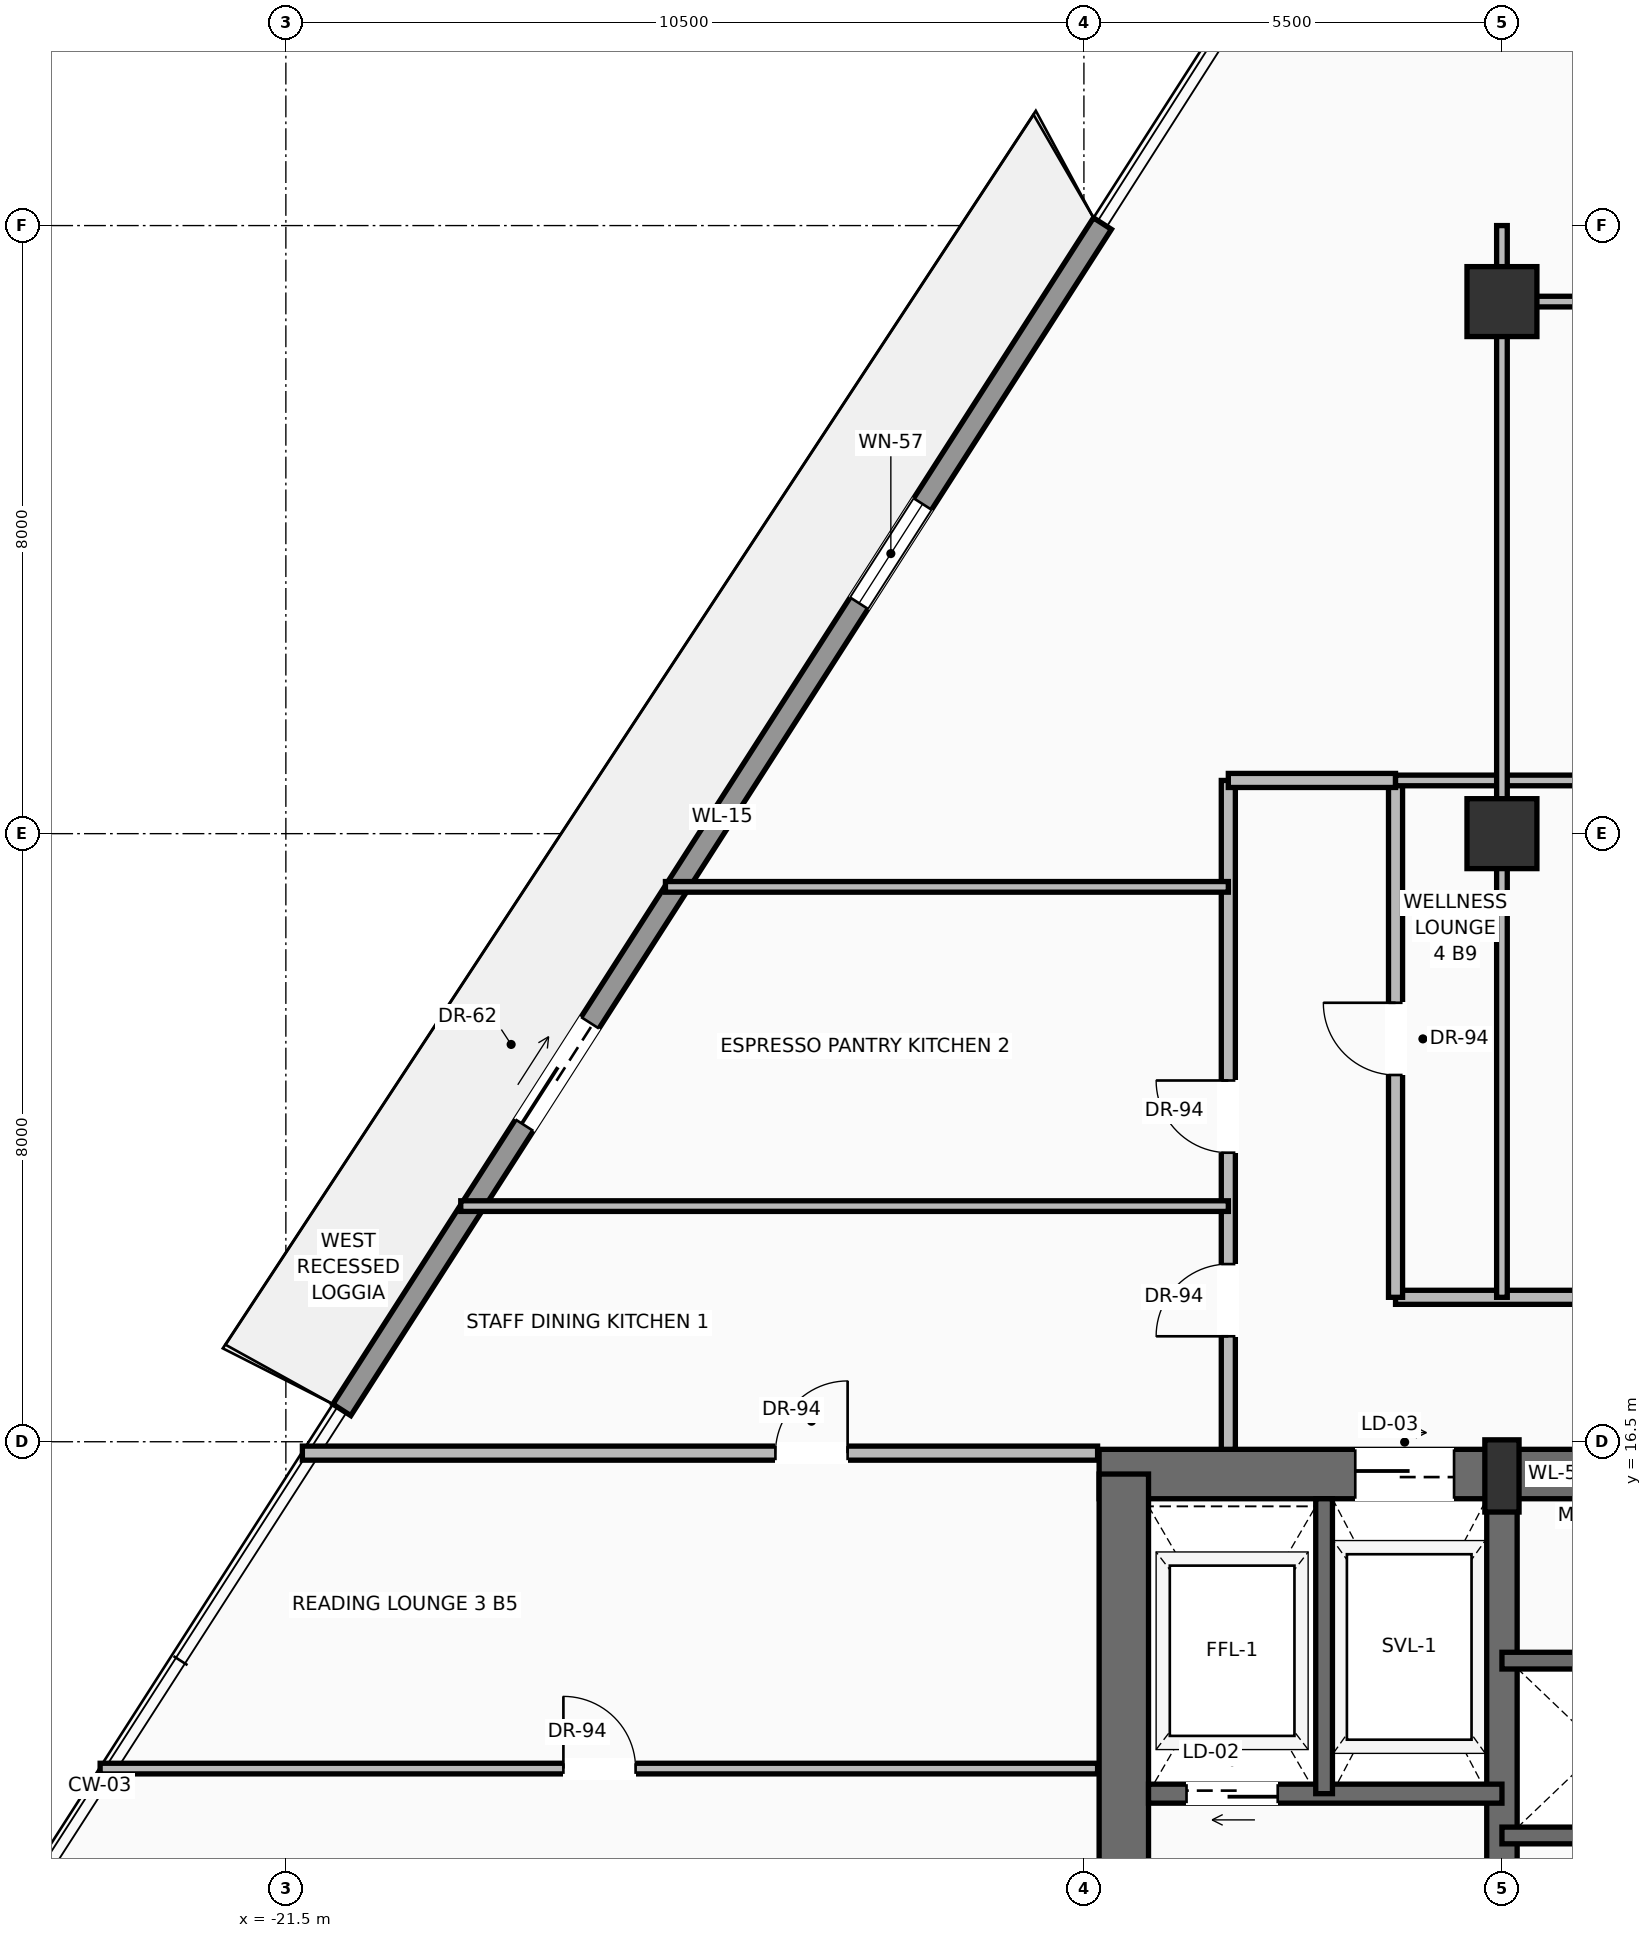
"""IFC4 building model, lengths in metres.
Left out: names, types, materials, properties, quantities, classifications, styles, units other than length and angle.
Written with IfcOpenShell. Run it as: python <this file> out.ifc"""

import sys

from ifc_helpers import new_model, si_unit, direction, frame, frame_2d, origin, origin_2d, place, context, subcontext, project, spatial, rectangle, extrude, source, transform, mapped, element, fill, save


model = new_model("IFC4")
c1 = context("Model", 3, precision=1e-05, world=origin(), true_north=direction((0.0, 1.0)))
c2 = subcontext(c1, "Body", "Model", "MODEL_VIEW")
j1 = project(units=[si_unit("LENGTHUNIT", "METRE"), si_unit("PLANEANGLEUNIT", "RADIAN")], contexts=[c1])
p1 = place(None, origin())
s1 = spatial("IfcSite", under=j1, at=p1, CompositionType="ELEMENT")
p2 = place(p1, origin())
s2 = spatial("IfcBuilding", under=s1, at=p2, CompositionType="ELEMENT")
p3 = place(p2, frame((0.0, 0.0, 155.2)))
s3 = spatial("IfcBuildingStorey", under=s2, at=p3, CompositionType="ELEMENT", Elevation=155.2)
p4 = place(p3, frame((-10.8, 16.075, 0.0), z_axis=(0.0, 0.0, 1.0), x_axis=(1.0, 0.0, 0.0)))
e1 = element("IfcWall", 1, at=p4, inside=s3, PredefinedType="SHEAR", context=c2, shape_type="SweptSolid", body=[
    extrude(rectangle(XDim=21.6, YDim=0.65, at=frame_2d((10.8, 0.0))), origin(), (0.0, 0.0, 1.0), 3.47),
])
p5 = place(p4, frame((3.37, 0.0, 0.0)))
e2 = element("IfcOpeningElement", 2, at=p5, cuts=e1, PredefinedType="OPENING", context=c2, shape_type="SweptSolid", body=[
    extrude(rectangle(XDim=1.3, YDim=2.3, at=frame_2d((0.65, 1.15))), frame((0.0, 0.335, 0.0), z_axis=(0.0, -1.0, 0.0), x_axis=(1.0, 0.0, 0.0)), (0.0, 0.0, 1.0), 0.67),
])
p6 = place(p4, frame((9.8, 0.0, 0.0)))
e3 = element("IfcOpeningElement", 3, at=p6, cuts=e1, PredefinedType="OPENING", context=c2, shape_type="SweptSolid", body=[
    extrude(rectangle(XDim=2.0, YDim=2.4, at=frame_2d((1.0, 1.2))), frame((0.0, 0.335, 0.0), z_axis=(0.0, -1.0, 0.0), x_axis=(1.0, 0.0, 0.0)), (0.0, 0.0, 1.0), 0.67),
])
p7 = place(p3, frame((-10.475, 0.525, 0.0), z_axis=(0.0, 0.0, 1.0), x_axis=(0.0, 1.0, 0.0)))
e4 = element("IfcWall", 4, at=p7, inside=s3, PredefinedType="SHEAR", context=c2, shape_type="SweptSolid", body=[
    extrude(rectangle(XDim=15.55, YDim=0.65, at=frame_2d((7.775, 0.0))), origin(), (0.0, 0.0, 1.0), 3.47),
])
p8 = place(p3, frame((-5.5, 0.525, 0.0), z_axis=(0.0, 0.0, 1.0), x_axis=(0.0, 1.0, 0.0)))
e5 = element("IfcWall", 5, at=p8, inside=s3, PredefinedType="SHEAR", context=c2, shape_type="SweptSolid", body=[
    extrude(rectangle(XDim=15.55, YDim=0.4, at=frame_2d((7.775, 0.0))), origin(), (0.0, 0.0, 1.0), 3.47),
])
p9 = place(p8, frame((8.975, 0.0, 0.0)))
e6 = element("IfcOpeningElement", 6, at=p9, cuts=e5, PredefinedType="OPENING", context=c2, shape_type="SweptSolid", body=[
    extrude(rectangle(XDim=1.1, YDim=2.2, at=frame_2d((0.55, 1.1))), frame((0.0, 0.21, 0.0), z_axis=(0.0, -1.0, 0.0), x_axis=(1.0, 0.0, 0.0)), (0.0, 0.0, 1.0), 0.42),
])
m1 = source(origin(), c2, "Body", "SweptSolid", [
    extrude(rectangle(XDim=0.45, YDim=0.95, at=origin_2d()), origin(), (0.0, 0.0, 1.0), 3.7),
])
p10 = place(p3, frame((-5.5, 16.05, 0.0), z_axis=(0.0, 0.0, 1.0), x_axis=(1.0, 0.0, 0.0)))
e7 = element("IfcColumn", 7, at=p10, inside=s3, PredefinedType="PILASTER", context=c2, shape_type="MappedRepresentation", body=[
    mapped(m1, transform((0.0, 0.0, 0.0), scale=1.0)),
])
m2 = source(origin(), c2, "Body", "SweptSolid", [
    extrude(rectangle(XDim=0.92, YDim=0.92, at=origin_2d()), origin(), (0.0, 0.0, 1.0), 3.7),
])
for number, where, z_axis, x_axis in (
    (8, (-5.5, 24.5, 0.0), (0.0, 0.0, 1.0), (1.0, 0.0, 0.0)),
    (9, (-5.5, 31.5, 0.0), (0.0, 0.0, 1.0), (1.0, 0.0, 0.0)),
):
    element("IfcColumn", number, at=place(p3, frame(where, z_axis=z_axis, x_axis=x_axis)), inside=s3, PredefinedType="COLUMN", context=c2, shape_type="MappedRepresentation", body=[
        mapped(m2, transform((0.0, 0.0, 0.0), scale=1.0)),
    ])
p11 = place(p3, frame((-20.763, 16.919, 0.0), z_axis=(0.0, 0.0, 1.0), x_axis=(0.539754896406, 0.841822221022, 0.0)))
e10 = element("IfcWall", 10, at=p11, inside=s3, PredefinedType="SOLIDWALL", context=c2, shape_type="SweptSolid", body=[
    extrude(rectangle(XDim=18.54, YDim=0.28, at=frame_2d((9.27, 0.0))), origin(), (0.0, 0.0, 1.0), 3.05),
])
p12 = place(p11, frame((4.45, 0.0, 0.0)))
e11 = element("IfcOpeningElement", 11, at=p12, cuts=e10, PredefinedType="OPENING", context=c2, shape_type="SweptSolid", body=[
    extrude(rectangle(XDim=1.6, YDim=2.35, at=frame_2d((0.8, 1.175))), frame((0.0, 0.15, 0.0), z_axis=(0.0, -1.0, 0.0), x_axis=(1.0, 0.0, 0.0)), (0.0, 0.0, 1.0), 0.3),
])
p13 = place(p11, frame((12.607, 0.0, 0.9)))
e12 = element("IfcOpeningElement", 12, at=p13, cuts=e10, PredefinedType="OPENING", context=c2, shape_type="SweptSolid", body=[
    extrude(rectangle(XDim=1.55, YDim=1.85, at=frame_2d((0.775, 0.925))), frame((0.0, 0.15, 0.0), z_axis=(0.0, -1.0, 0.0), x_axis=(1.0, 0.0, 0.0)), (0.0, 0.0, 1.0), 0.3),
])
p14 = place(p3, frame((-5.5, 11.87, 0.0), z_axis=(0.0, 0.0, 1.0), x_axis=(-1.0, 0.0, 0.0)))
e13 = element("IfcWall", 13, at=p14, inside=s3, PredefinedType="SOLIDWALL", context=c2, shape_type="SweptSolid", body=[
    extrude(rectangle(XDim=4.65, YDim=0.25, at=frame_2d((2.325, 0.0))), origin(), (0.0, 0.0, 1.0), 3.47),
])
p15 = place(p14, frame((2.95, 0.0, 0.0)))
e14 = element("IfcOpeningElement", 14, at=p15, cuts=e13, PredefinedType="OPENING", context=c2, shape_type="SweptSolid", body=[
    extrude(rectangle(XDim=1.2, YDim=2.25, at=frame_2d((0.6, 1.125))), frame((0.0, 0.135, 0.0), z_axis=(0.0, -1.0, 0.0), x_axis=(1.0, 0.0, 0.0)), (0.0, 0.0, 1.0), 0.27),
])
p16 = place(p3, frame((-7.84, 11.87, 0.0), z_axis=(0.0, 0.0, 1.0), x_axis=(0.0, 1.0, 0.0)))
e15 = element("IfcWall", 15, at=p16, inside=s3, PredefinedType="SOLIDWALL", context=c2, shape_type="SweptSolid", body=[
    extrude(rectangle(XDim=3.88, YDim=0.22, at=frame_2d((1.94, 0.0))), origin(), (0.0, 0.0, 1.0), 3.47),
])
for number, where, z_axis, x_axis in (
    (16, (-5.5, 11.32, 0.0), (0.0, 0.0, 1.0), (1.0, 0.0, 0.0)),
    (17, (-5.5, 13.62, 0.0), (0.0, 0.0, 1.0), (1.0, 0.0, 0.0)),
):
    element("IfcWall", number, at=place(p3, frame(where, z_axis=z_axis, x_axis=x_axis)), inside=s3, PredefinedType="SOLIDWALL", context=c2, shape_type="SweptSolid", body=[
        extrude(rectangle(XDim=7.32, YDim=0.22, at=frame_2d((3.66, 0.0))), origin(), (0.0, 0.0, 1.0), 3.47),
    ])
p17 = place(p3, frame((-6.9, 18.4, 0.0), z_axis=(0.0, 0.0, 1.0), x_axis=(1.0, 0.0, 0.0)))
e18 = element("IfcWall", 18, at=p17, inside=s3, PredefinedType="PARTITIONING", context=c2, shape_type="SweptSolid", body=[
    extrude(rectangle(XDim=14.1, YDim=0.185, at=frame_2d((7.05, 0.0))), origin(), (0.0, 0.0, 1.0), 2.846),
])
p18 = place(p17, frame((6.575, 0.0, 0.0)))
e19 = element("IfcOpeningElement", 19, at=p18, cuts=e18, PredefinedType="OPENING", context=c2, shape_type="SweptSolid", body=[
    extrude(rectangle(XDim=0.95, YDim=2.2, at=frame_2d((0.475, 1.1))), frame((0.0, 0.103, 0.0), z_axis=(0.0, -1.0, 0.0), x_axis=(1.0, 0.0, 0.0)), (0.0, 0.0, 1.0), 0.205),
])
p19 = place(p3, frame((-6.9, 18.4, 0.0), z_axis=(0.0, 0.0, 1.0), x_axis=(0.0, 1.0, 0.0)))
e20 = element("IfcWall", 20, at=p19, inside=s3, PredefinedType="PARTITIONING", context=c2, shape_type="SweptSolid", body=[
    extrude(rectangle(XDim=6.8, YDim=0.185, at=frame_2d((3.4, 0.0))), origin(), (0.0, 0.0, 1.0), 2.846),
])
p20 = place(p19, frame((2.925, 0.0, 0.0)))
e21 = element("IfcOpeningElement", 21, at=p20, cuts=e20, PredefinedType="OPENING", context=c2, shape_type="SweptSolid", body=[
    extrude(rectangle(XDim=0.95, YDim=2.2, at=frame_2d((0.475, 1.1))), frame((0.0, 0.103, 0.0), z_axis=(0.0, -1.0, 0.0), x_axis=(1.0, 0.0, 0.0)), (0.0, 0.0, 1.0), 0.205),
])
p21 = place(p3, frame((-9.1, 16.4, 0.0), z_axis=(0.0, 0.0, 1.0), x_axis=(0.0, 1.0, 0.0)))
e22 = element("IfcWall", 22, at=p21, inside=s3, PredefinedType="PARTITIONING", context=c2, shape_type="SweptSolid", body=[
    extrude(rectangle(XDim=8.8, YDim=0.185, at=frame_2d((4.4, 0.0))), origin(), (0.0, 0.0, 1.0), 2.846),
])
p22 = place(p21, frame((3.903, 0.0, 0.0)))
e23 = element("IfcOpeningElement", 23, at=p22, cuts=e22, PredefinedType="OPENING", context=c2, shape_type="SweptSolid", body=[
    extrude(rectangle(XDim=0.95, YDim=2.2, at=frame_2d((0.475, 1.1))), frame((0.0, 0.103, 0.0), z_axis=(0.0, -1.0, 0.0), x_axis=(1.0, 0.0, 0.0)), (0.0, 0.0, 1.0), 0.205),
])
p23 = place(p21, frame((1.487, 0.0, 0.0)))
e24 = element("IfcOpeningElement", 24, at=p23, cuts=e22, PredefinedType="OPENING", context=c2, shape_type="SweptSolid", body=[
    extrude(rectangle(XDim=0.95, YDim=2.2, at=frame_2d((0.475, 1.1))), frame((0.0, 0.103, 0.0), z_axis=(0.0, -1.0, 0.0), x_axis=(1.0, 0.0, 0.0)), (0.0, 0.0, 1.0), 0.205),
])
p24 = place(p3, frame((-9.1, 25.2, 0.0), z_axis=(0.0, 0.0, 1.0), x_axis=(1.0, 0.0, 0.0)))
e25 = element("IfcWall", 25, at=p24, inside=s3, PredefinedType="PARTITIONING", context=c2, shape_type="SweptSolid", body=[
    extrude(rectangle(XDim=2.2, YDim=0.185, at=frame_2d((1.1, 0.0))), origin(), (0.0, 0.0, 1.0), 3.462),
])
p25 = place(p3, frame((-21.283, 16.35, 0.0), z_axis=(0.0, 0.0, 1.0), x_axis=(1.0, 0.0, 0.0)))
e26 = element("IfcWall", 26, at=p25, inside=s3, PredefinedType="PARTITIONING", context=c2, shape_type="SweptSolid", body=[
    extrude(rectangle(XDim=10.463, YDim=0.185, at=frame_2d((5.231, 0.0))), origin(), (0.0, 0.0, 1.0), 3.462),
])
p26 = place(p25, frame((6.224, 0.0, 0.0)))
e27 = element("IfcOpeningElement", 27, at=p26, cuts=e26, PredefinedType="OPENING", context=c2, shape_type="SweptSolid", body=[
    extrude(rectangle(XDim=0.95, YDim=2.2, at=frame_2d((0.475, 1.1))), frame((0.0, 0.103, 0.0), z_axis=(0.0, -1.0, 0.0), x_axis=(1.0, 0.0, 0.0)), (0.0, 0.0, 1.0), 0.205),
])
p27 = place(p3, frame((-6.9, 25.2, 0.0), z_axis=(0.0, 0.0, 1.0), x_axis=(1.0, 0.0, 0.0)))
e28 = element("IfcWall", 28, at=p27, inside=s3, PredefinedType="PARTITIONING", context=c2, shape_type="SweptSolid", body=[
    extrude(rectangle(XDim=14.1, YDim=0.14, at=frame_2d((7.05, 0.0))), origin(), (0.0, 0.0, 1.0), 3.462),
])
p28 = place(p27, frame((6.432, 0.0, 0.0)))
e29 = element("IfcOpeningElement", 29, at=p28, cuts=e28, PredefinedType="OPENING", context=c2, shape_type="SweptSolid", body=[
    extrude(rectangle(XDim=0.95, YDim=2.2, at=frame_2d((0.475, 1.1))), frame((0.0, 0.08, 0.0), z_axis=(0.0, -1.0, 0.0), x_axis=(1.0, 0.0, 0.0)), (0.0, 0.0, 1.0), 0.16),
])
p29 = place(p3, frame((-5.5, 18.4, 0.0), z_axis=(0.0, 0.0, 1.0), x_axis=(0.0, 1.0, 0.0)))
e30 = element("IfcWall", 30, at=p29, inside=s3, PredefinedType="PARTITIONING", context=c2, shape_type="SweptSolid", body=[
    extrude(rectangle(XDim=14.1, YDim=0.14, at=frame_2d((7.05, 0.0))), origin(), (0.0, 0.0, 1.0), 2.846),
])
p30 = place(p3, frame((-5.5, 31.5, 0.0), z_axis=(0.0, 0.0, 1.0), x_axis=(1.0, 0.0, 0.0)))
e31 = element("IfcWall", 31, at=p30, inside=s3, PredefinedType="PARTITIONING", context=c2, shape_type="SweptSolid", body=[
    extrude(rectangle(XDim=11.0, YDim=0.14, at=frame_2d((5.5, 0.0))), origin(), (0.0, 0.0, 1.0), 2.846),
])
p31 = place(p3, frame((-23.944, 12.2, 0.0), z_axis=(0.0, 0.0, 1.0), x_axis=(1.0, 0.0, 0.0)))
e32 = element("IfcWall", 32, at=p31, inside=s3, PredefinedType="PARTITIONING", context=c2, shape_type="SweptSolid", body=[
    extrude(rectangle(XDim=13.124, YDim=0.14, at=frame_2d((6.562, 0.0))), origin(), (0.0, 0.0, 1.0), 3.462),
])
p32 = place(p31, frame((6.095, 0.0, 0.0)))
e33 = element("IfcOpeningElement", 33, at=p32, cuts=e32, PredefinedType="OPENING", context=c2, shape_type="SweptSolid", body=[
    extrude(rectangle(XDim=0.95, YDim=2.2, at=frame_2d((0.475, 1.1))), frame((0.0, 0.08, 0.0), z_axis=(0.0, -1.0, 0.0), x_axis=(1.0, 0.0, 0.0)), (0.0, 0.0, 1.0), 0.16),
])
p33 = place(p3, frame((-19.199, 19.6, 0.0), z_axis=(0.0, 0.0, 1.0), x_axis=(1.0, 0.0, 0.0)))
e34 = element("IfcWall", 34, at=p33, inside=s3, PredefinedType="PARTITIONING", context=c2, shape_type="SweptSolid", body=[
    extrude(rectangle(XDim=10.099, YDim=0.14, at=frame_2d((5.049, 0.0))), origin(), (0.0, 0.0, 1.0), 3.049),
])
p34 = place(p3, frame((-16.506, 23.8, 0.0), z_axis=(0.0, 0.0, 1.0), x_axis=(1.0, 0.0, 0.0)))
e35 = element("IfcWall", 35, at=p34, inside=s3, PredefinedType="PARTITIONING", context=c2, shape_type="SweptSolid", body=[
    extrude(rectangle(XDim=7.406, YDim=0.14, at=frame_2d((3.703, 0.0))), origin(), (0.0, 0.0, 1.0), 3.462),
])
m3 = source(origin(), c2, "Body", "SweptSolid", [
    extrude(rectangle(XDim=1.6, YDim=2.35, at=frame_2d((0.8, 1.175))), frame((0.0, 0.025, 0.0), z_axis=(0.0, -1.0, 0.0), x_axis=(1.0, 0.0, 0.0)), (0.0, 0.0, 1.0), 0.05),
])
p35 = place(p12, origin())
e36 = element("IfcDoor", 36, at=p35, inside=s3, OperationType="SLIDING_TO_LEFT", PredefinedType="DOOR", context=c2, shape_type="MappedRepresentation", body=[
    mapped(m3, transform((0.0, 0.0, 0.0), scale=1.0)),
])
fill(e11, e36)
m4 = source(origin(), c2, "Body", "SweptSolid", [
    extrude(rectangle(XDim=1.55, YDim=1.85, at=frame_2d((0.775, 0.925))), frame((0.0, 0.03, 0.0), z_axis=(0.0, -1.0, 0.0), x_axis=(1.0, 0.0, 0.0)), (0.0, 0.0, 1.0), 0.06),
])
p36 = place(p13, origin())
e37 = element("IfcWindow", 37, at=p36, inside=s3, PartitioningType="SINGLE_PANEL", PredefinedType="WINDOW", context=c2, shape_type="MappedRepresentation", body=[
    mapped(m4, transform((0.0, 0.0, 0.0), scale=1.0)),
])
fill(e12, e37)
m5 = source(origin(), c2, "Body", "SweptSolid", [
    extrude(rectangle(XDim=1.2, YDim=2.25, at=frame_2d((0.6, 1.125))), frame((0.0, 0.025, 0.0), z_axis=(0.0, -1.0, 0.0), x_axis=(1.0, 0.0, 0.0)), (0.0, 0.0, 1.0), 0.05),
])
p37 = place(p15, origin())
e38 = element("IfcDoor", 38, at=p37, inside=s3, OperationType="SLIDING_TO_LEFT", PredefinedType="DOOR", context=c2, shape_type="MappedRepresentation", body=[
    mapped(m5, transform((0.0, 0.0, 0.0), scale=1.0)),
])
fill(e14, e38)
m6 = source(origin(), c2, "Body", "SweptSolid", [
    extrude(rectangle(XDim=1.3, YDim=2.3, at=frame_2d((0.65, 1.15))), frame((0.0, 0.025, 0.0), z_axis=(0.0, -1.0, 0.0), x_axis=(1.0, 0.0, 0.0)), (0.0, 0.0, 1.0), 0.05),
])
p38 = place(p5, origin())
e39 = element("IfcDoor", 39, at=p38, inside=s3, OperationType="SLIDING_TO_RIGHT", PredefinedType="DOOR", context=c2, shape_type="MappedRepresentation", body=[
    mapped(m6, transform((0.0, 0.0, 0.0), scale=1.0)),
])
fill(e2, e39)
m7 = source(origin(), c2, "Body", "SweptSolid", [
    extrude(rectangle(XDim=0.95, YDim=2.2, at=frame_2d((0.475, 1.1))), frame((0.0, 0.025, 0.0), z_axis=(0.0, -1.0, 0.0), x_axis=(1.0, 0.0, 0.0)), (0.0, 0.0, 1.0), 0.05),
])
p39 = place(p22, origin())
e40 = element("IfcDoor", 40, at=p39, inside=s3, OperationType="SINGLE_SWING_RIGHT", PredefinedType="DOOR", context=c2, shape_type="MappedRepresentation", body=[
    mapped(m7, transform((0.0, 0.0, 0.0), scale=1.0)),
])
fill(e23, e40)
p40 = place(p26, origin())
e41 = element("IfcDoor", 41, at=p40, inside=s3, OperationType="SINGLE_SWING_RIGHT", PredefinedType="DOOR", context=c2, shape_type="MappedRepresentation", body=[
    mapped(m7, transform((0.0, 0.0, 0.0), scale=1.0)),
])
fill(e27, e41)
p41 = place(p23, origin())
e42 = element("IfcDoor", 42, at=p41, inside=s3, OperationType="SINGLE_SWING_LEFT", PredefinedType="DOOR", context=c2, shape_type="MappedRepresentation", body=[
    mapped(m7, transform((0.0, 0.0, 0.0), scale=1.0)),
])
fill(e24, e42)
p42 = place(p20, origin())
e43 = element("IfcDoor", 43, at=p42, inside=s3, OperationType="SINGLE_SWING_RIGHT", PredefinedType="DOOR", context=c2, shape_type="MappedRepresentation", body=[
    mapped(m7, transform((0.0, 0.0, 0.0), scale=1.0)),
])
fill(e21, e43)
p43 = place(p32, origin())
e44 = element("IfcDoor", 44, at=p43, inside=s3, OperationType="SINGLE_SWING_LEFT", PredefinedType="DOOR", context=c2, shape_type="MappedRepresentation", body=[
    mapped(m7, transform((0.0, 0.0, 0.0), scale=1.0)),
])
fill(e33, e44)
save(model, sys.argv[1])
